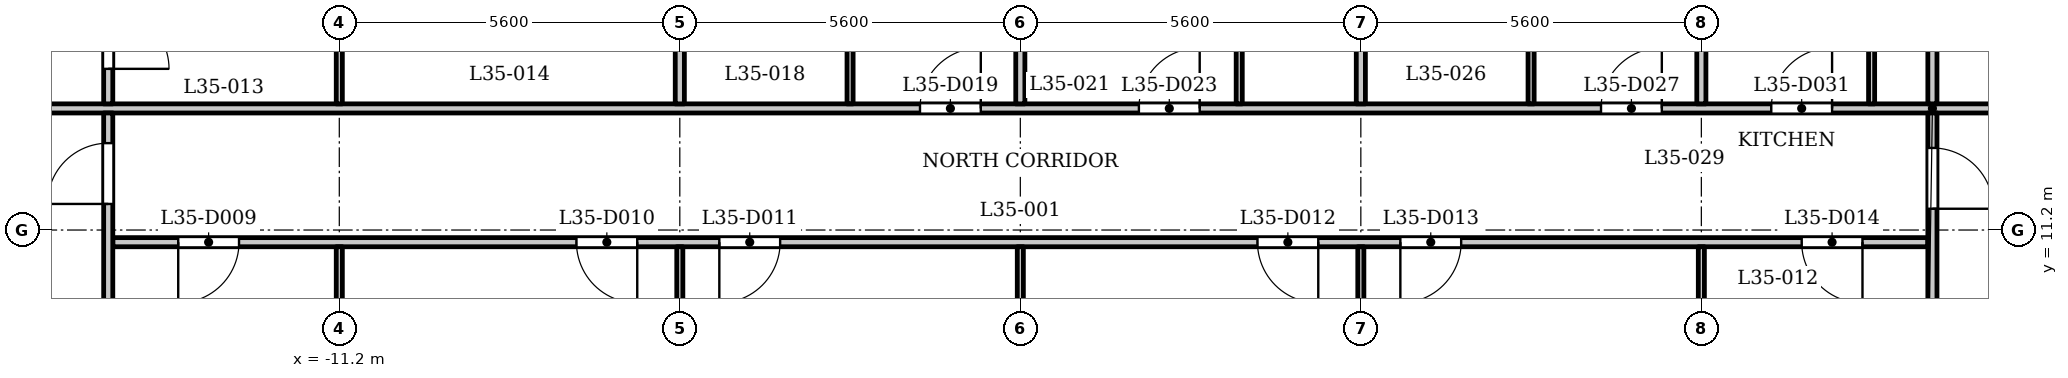
"""IFC4 building model, lengths in metres.
Left out: names, types, materials, properties, quantities, classifications, styles, units other than length and angle.
Written with IfcOpenShell. Run it as: python <this file> out.ifc"""

import sys

from ifc_helpers import new_model, si_unit, direction, frame, frame_2d, origin, place, context, subcontext, project, spatial, rectangle, extrude, element, fill, save


model = new_model("IFC4")
c1 = context("Model", 3, precision=1e-05, world=origin(), true_north=direction((0.0, 1.0)))
c2 = subcontext(c1, "Body", "Model", "MODEL_VIEW")
j1 = project(units=[si_unit("LENGTHUNIT", "METRE"), si_unit("PLANEANGLEUNIT", "RADIAN")], contexts=[c1])
p1 = place(None, origin())
s1 = spatial("IfcSite", under=j1, at=p1, CompositionType="ELEMENT")
p2 = place(p1, origin())
s2 = spatial("IfcBuilding", under=s1, at=p2, CompositionType="ELEMENT")
p3 = place(p2, frame((0.0, 0.0, 139.6)))
s3 = spatial("IfcBuildingStorey", under=s2, at=p3, CompositionType="ELEMENT", Elevation=139.6)
p4 = place(p3, frame((-14.925, 11.0, 0.0), z_axis=(0.0, 0.0, 1.0), x_axis=(1.0, 0.0, 0.0)))
e1 = element("IfcWall", 1, at=p4, inside=s3, PredefinedType="PARTITIONING", context=c2, shape_type="SweptSolid", body=[
    extrude(rectangle(XDim=29.85, YDim=0.15, at=frame_2d((14.925, 0.0))), origin(), (0.0, 0.0, 1.0), 3.2),
])
p5 = place(p4, frame((1.076, 0.0, 0.0)))
e2 = element("IfcOpeningElement", 2, at=p5, cuts=e1, PredefinedType="OPENING", context=c2, shape_type="SweptSolid", body=[
    extrude(rectangle(XDim=1.0, YDim=2.1, at=frame_2d((0.5, 1.05))), frame((0.0, 0.085, 0.0), z_axis=(0.0, -1.0, 0.0), x_axis=(1.0, 0.0, 0.0)), (0.0, 0.0, 1.0), 0.17),
])
p6 = place(p4, frame((7.625, 0.0, 0.0)))
e3 = element("IfcOpeningElement", 3, at=p6, cuts=e1, PredefinedType="OPENING", context=c2, shape_type="SweptSolid", body=[
    extrude(rectangle(XDim=1.0, YDim=2.1, at=frame_2d((0.5, 1.05))), frame((0.0, 0.085, 0.0), z_axis=(0.0, -1.0, 0.0), x_axis=(1.0, 0.0, 0.0)), (0.0, 0.0, 1.0), 0.17),
])
p7 = place(p4, frame((9.975, 0.0, 0.0)))
e4 = element("IfcOpeningElement", 4, at=p7, cuts=e1, PredefinedType="OPENING", context=c2, shape_type="SweptSolid", body=[
    extrude(rectangle(XDim=1.0, YDim=2.1, at=frame_2d((0.5, 1.05))), frame((0.0, 0.085, 0.0), z_axis=(0.0, -1.0, 0.0), x_axis=(1.0, 0.0, 0.0)), (0.0, 0.0, 1.0), 0.17),
])
p8 = place(p4, frame((18.825, 0.0, 0.0)))
e5 = element("IfcOpeningElement", 5, at=p8, cuts=e1, PredefinedType="OPENING", context=c2, shape_type="SweptSolid", body=[
    extrude(rectangle(XDim=1.0, YDim=2.1, at=frame_2d((0.5, 1.05))), frame((0.0, 0.085, 0.0), z_axis=(0.0, -1.0, 0.0), x_axis=(1.0, 0.0, 0.0)), (0.0, 0.0, 1.0), 0.17),
])
p9 = place(p4, frame((21.175, 0.0, 0.0)))
e6 = element("IfcOpeningElement", 6, at=p9, cuts=e1, PredefinedType="OPENING", context=c2, shape_type="SweptSolid", body=[
    extrude(rectangle(XDim=1.0, YDim=2.1, at=frame_2d((0.5, 1.05))), frame((0.0, 0.085, 0.0), z_axis=(0.0, -1.0, 0.0), x_axis=(1.0, 0.0, 0.0)), (0.0, 0.0, 1.0), 0.17),
])
p10 = place(p4, frame((27.775, 0.0, 0.0)))
e7 = element("IfcOpeningElement", 7, at=p10, cuts=e1, PredefinedType="OPENING", context=c2, shape_type="SweptSolid", body=[
    extrude(rectangle(XDim=1.0, YDim=2.1, at=frame_2d((0.5, 1.05))), frame((0.0, 0.085, 0.0), z_axis=(0.0, -1.0, 0.0), x_axis=(1.0, 0.0, 0.0)), (0.0, 0.0, 1.0), 0.17),
])
p11 = place(p3, frame((-17.4, 13.2, 0.0), z_axis=(0.0, 0.0, 1.0), x_axis=(1.0, 0.0, 0.0)))
e8 = element("IfcWall", 8, at=p11, inside=s3, PredefinedType="PARTITIONING", context=c2, shape_type="SweptSolid", body=[
    extrude(rectangle(XDim=34.8, YDim=0.15, at=frame_2d((17.4, 0.0))), origin(), (0.0, 0.0, 1.0), 3.2),
])
p12 = place(p11, frame((0.25, 0.0, 0.0)))
e9 = element("IfcOpeningElement", 9, at=p12, cuts=e8, PredefinedType="OPENING", context=c2, shape_type="SweptSolid", body=[
    extrude(rectangle(XDim=1.0, YDim=2.1, at=frame_2d((0.5, 1.05))), frame((0.0, 0.085, 0.0), z_axis=(0.0, -1.0, 0.0), x_axis=(1.0, 0.0, 0.0)), (0.0, 0.0, 1.0), 0.17),
])
p13 = place(p11, frame((33.65, 0.0, 0.0)))
e10 = element("IfcOpeningElement", 10, at=p13, cuts=e8, PredefinedType="OPENING", context=c2, shape_type="SweptSolid", body=[
    extrude(rectangle(XDim=1.0, YDim=2.1, at=frame_2d((0.5, 1.05))), frame((0.0, 0.085, 0.0), z_axis=(0.0, -1.0, 0.0), x_axis=(1.0, 0.0, 0.0)), (0.0, 0.0, 1.0), 0.17),
])
p14 = place(p11, frame((15.75, 0.0, 0.0)))
e11 = element("IfcOpeningElement", 11, at=p14, cuts=e8, PredefinedType="OPENING", context=c2, shape_type="SweptSolid", body=[
    extrude(rectangle(XDim=1.0, YDim=2.1, at=frame_2d((0.5, 1.05))), frame((0.0, 0.085, 0.0), z_axis=(0.0, -1.0, 0.0), x_axis=(1.0, 0.0, 0.0)), (0.0, 0.0, 1.0), 0.17),
])
p15 = place(p11, frame((19.35, 0.0, 0.0)))
e12 = element("IfcOpeningElement", 12, at=p15, cuts=e8, PredefinedType="OPENING", context=c2, shape_type="SweptSolid", body=[
    extrude(rectangle(XDim=1.0, YDim=2.1, at=frame_2d((0.5, 1.05))), frame((0.0, 0.085, 0.0), z_axis=(0.0, -1.0, 0.0), x_axis=(1.0, 0.0, 0.0)), (0.0, 0.0, 1.0), 0.17),
])
p16 = place(p11, frame((26.95, 0.0, 0.0)))
e13 = element("IfcOpeningElement", 13, at=p16, cuts=e8, PredefinedType="OPENING", context=c2, shape_type="SweptSolid", body=[
    extrude(rectangle(XDim=1.0, YDim=2.1, at=frame_2d((0.5, 1.05))), frame((0.0, 0.085, 0.0), z_axis=(0.0, -1.0, 0.0), x_axis=(1.0, 0.0, 0.0)), (0.0, 0.0, 1.0), 0.17),
])
p17 = place(p11, frame((29.75, 0.0, 0.0)))
e14 = element("IfcOpeningElement", 14, at=p17, cuts=e8, PredefinedType="OPENING", context=c2, shape_type="SweptSolid", body=[
    extrude(rectangle(XDim=1.0, YDim=2.1, at=frame_2d((0.5, 1.05))), frame((0.0, 0.085, 0.0), z_axis=(0.0, -1.0, 0.0), x_axis=(1.0, 0.0, 0.0)), (0.0, 0.0, 1.0), 0.17),
])
p18 = place(p3, frame((-15.0, 6.769, 0.0), z_axis=(0.0, 0.0, 1.0), x_axis=(0.0, 1.0, 0.0)))
e15 = element("IfcWall", 15, at=p18, inside=s3, PredefinedType="PARTITIONING", context=c2, shape_type="SweptSolid", body=[
    extrude(rectangle(XDim=6.356, YDim=0.15, at=frame_2d((3.178, 0.0))), origin(), (0.0, 0.0, 1.0), 3.2),
])
p19 = place(p18, frame((4.86, 0.0, 0.0)))
e16 = element("IfcOpeningElement", 16, at=p19, cuts=e15, PredefinedType="OPENING", context=c2, shape_type="SweptSolid", body=[
    extrude(rectangle(XDim=1.0, YDim=2.1, at=frame_2d((0.5, 1.05))), frame((0.0, 0.085, 0.0), z_axis=(0.0, -1.0, 0.0), x_axis=(1.0, 0.0, 0.0)), (0.0, 0.0, 1.0), 0.17),
])
p20 = place(p3, frame((-15.0, 13.275, 0.0), z_axis=(0.0, 0.0, 1.0), x_axis=(0.0, 1.0, 0.0)))
e17 = element("IfcWall", 17, at=p20, inside=s3, PredefinedType="PARTITIONING", context=c2, shape_type="SweptSolid", body=[
    extrude(rectangle(XDim=2.05, YDim=0.15, at=frame_2d((1.025, 0.0))), origin(), (0.0, 0.0, 1.0), 3.2),
])
p21 = place(p20, frame((0.576, 0.0, 0.0)))
e18 = element("IfcOpeningElement", 18, at=p21, cuts=e17, PredefinedType="OPENING", context=c2, shape_type="SweptSolid", body=[
    extrude(rectangle(XDim=1.0, YDim=2.1, at=frame_2d((0.5, 1.05))), frame((0.0, 0.085, 0.0), z_axis=(0.0, -1.0, 0.0), x_axis=(1.0, 0.0, 0.0)), (0.0, 0.0, 1.0), 0.17),
])
p22 = place(p3, frame((-11.2, 7.32, 0.0), z_axis=(0.0, 0.0, 1.0), x_axis=(0.0, 1.0, 0.0)))
e19 = element("IfcWall", 19, at=p22, inside=s3, PredefinedType="PARTITIONING", context=c2, shape_type="SweptSolid", body=[
    extrude(rectangle(XDim=3.605, YDim=0.1, at=frame_2d((1.802, 0.0))), origin(), (0.0, 0.0, 1.0), 3.2),
])
p23 = place(p3, frame((-11.2, 13.275, 0.0), z_axis=(0.0, 0.0, 1.0), x_axis=(0.0, 1.0, 0.0)))
e20 = element("IfcWall", 20, at=p23, inside=s3, PredefinedType="PARTITIONING", context=c2, shape_type="SweptSolid", body=[
    extrude(rectangle(XDim=3.175, YDim=0.1, at=frame_2d((1.587, 0.0))), origin(), (0.0, 0.0, 1.0), 3.2),
])
p24 = place(p3, frame((-5.6, 7.32, 0.0), z_axis=(0.0, 0.0, 1.0), x_axis=(0.0, 1.0, 0.0)))
e21 = element("IfcWall", 21, at=p24, inside=s3, PredefinedType="PARTITIONING", context=c2, shape_type="SweptSolid", body=[
    extrude(rectangle(XDim=3.605, YDim=0.1, at=frame_2d((1.802, 0.0))), origin(), (0.0, 0.0, 1.0), 3.2),
])
p25 = place(p3, frame((-5.6, 13.275, 0.0), z_axis=(0.0, 0.0, 1.0), x_axis=(0.0, 1.0, 0.0)))
e22 = element("IfcWall", 22, at=p25, inside=s3, PredefinedType="PARTITIONING", context=c2, shape_type="SweptSolid", body=[
    extrude(rectangle(XDim=3.175, YDim=0.15, at=frame_2d((1.587, 0.0))), origin(), (0.0, 0.0, 1.0), 3.2),
])
p26 = place(p3, frame((-2.8, 13.275, 0.0), z_axis=(0.0, 0.0, 1.0), x_axis=(0.0, 1.0, 0.0)))
e23 = element("IfcWall", 23, at=p26, inside=s3, PredefinedType="PARTITIONING", context=c2, shape_type="SweptSolid", body=[
    extrude(rectangle(XDim=3.175, YDim=0.1, at=frame_2d((1.587, 0.0))), origin(), (0.0, 0.0, 1.0), 3.2),
])
p27 = place(p3, frame((0.0, 7.32, 0.0), z_axis=(0.0, 0.0, 1.0), x_axis=(0.0, 1.0, 0.0)))
e24 = element("IfcWall", 24, at=p27, inside=s3, PredefinedType="PARTITIONING", context=c2, shape_type="SweptSolid", body=[
    extrude(rectangle(XDim=3.605, YDim=0.1, at=frame_2d((1.802, 0.0))), origin(), (0.0, 0.0, 1.0), 3.2),
])
p28 = place(p3, frame((0.0, 13.275, 0.0), z_axis=(0.0, 0.0, 1.0), x_axis=(0.0, 1.0, 0.0)))
e25 = element("IfcWall", 25, at=p28, inside=s3, PredefinedType="PARTITIONING", context=c2, shape_type="SweptSolid", body=[
    extrude(rectangle(XDim=3.175, YDim=0.15, at=frame_2d((1.587, 0.0))), origin(), (0.0, 0.0, 1.0), 3.2),
])
p29 = place(p3, frame((3.6, 13.275, 0.0), z_axis=(0.0, 0.0, 1.0), x_axis=(0.0, 1.0, 0.0)))
e26 = element("IfcWall", 26, at=p29, inside=s3, PredefinedType="PARTITIONING", context=c2, shape_type="SweptSolid", body=[
    extrude(rectangle(XDim=3.175, YDim=0.1, at=frame_2d((1.587, 0.0))), origin(), (0.0, 0.0, 1.0), 3.2),
])
p30 = place(p3, frame((5.6, 7.32, 0.0), z_axis=(0.0, 0.0, 1.0), x_axis=(0.0, 1.0, 0.0)))
e27 = element("IfcWall", 27, at=p30, inside=s3, PredefinedType="PARTITIONING", context=c2, shape_type="SweptSolid", body=[
    extrude(rectangle(XDim=3.605, YDim=0.1, at=frame_2d((1.802, 0.0))), origin(), (0.0, 0.0, 1.0), 3.2),
])
p31 = place(p3, frame((5.6, 13.275, 0.0), z_axis=(0.0, 0.0, 1.0), x_axis=(0.0, 1.0, 0.0)))
e28 = element("IfcWall", 28, at=p31, inside=s3, PredefinedType="PARTITIONING", context=c2, shape_type="SweptSolid", body=[
    extrude(rectangle(XDim=3.175, YDim=0.15, at=frame_2d((1.587, 0.0))), origin(), (0.0, 0.0, 1.0), 3.2),
])
p32 = place(p3, frame((8.4, 13.275, 0.0), z_axis=(0.0, 0.0, 1.0), x_axis=(0.0, 1.0, 0.0)))
e29 = element("IfcWall", 29, at=p32, inside=s3, PredefinedType="PARTITIONING", context=c2, shape_type="SweptSolid", body=[
    extrude(rectangle(XDim=3.175, YDim=0.1, at=frame_2d((1.587, 0.0))), origin(), (0.0, 0.0, 1.0), 3.2),
])
p33 = place(p3, frame((11.2, 7.32, 0.0), z_axis=(0.0, 0.0, 1.0), x_axis=(0.0, 1.0, 0.0)))
e30 = element("IfcWall", 30, at=p33, inside=s3, PredefinedType="PARTITIONING", context=c2, shape_type="SweptSolid", body=[
    extrude(rectangle(XDim=3.605, YDim=0.1, at=frame_2d((1.802, 0.0))), origin(), (0.0, 0.0, 1.0), 3.2),
])
p34 = place(p3, frame((11.2, 13.275, 0.0), z_axis=(0.0, 0.0, 1.0), x_axis=(0.0, 1.0, 0.0)))
e31 = element("IfcWall", 31, at=p34, inside=s3, PredefinedType="PARTITIONING", context=c2, shape_type="SweptSolid", body=[
    extrude(rectangle(XDim=3.175, YDim=0.15, at=frame_2d((1.587, 0.0))), origin(), (0.0, 0.0, 1.0), 3.2),
])
p35 = place(p3, frame((14.0, 13.275, 0.0), z_axis=(0.0, 0.0, 1.0), x_axis=(0.0, 1.0, 0.0)))
e32 = element("IfcWall", 32, at=p35, inside=s3, PredefinedType="PARTITIONING", context=c2, shape_type="SweptSolid", body=[
    extrude(rectangle(XDim=3.175, YDim=0.1, at=frame_2d((1.587, 0.0))), origin(), (0.0, 0.0, 1.0), 3.2),
])
p36 = place(p3, frame((15.0, 6.769, 0.0), z_axis=(0.0, 0.0, 1.0), x_axis=(0.0, 1.0, 0.0)))
e33 = element("IfcWall", 33, at=p36, inside=s3, PredefinedType="PARTITIONING", context=c2, shape_type="SweptSolid", body=[
    extrude(rectangle(XDim=6.356, YDim=0.15, at=frame_2d((3.178, 0.0))), origin(), (0.0, 0.0, 1.0), 3.2),
])
p37 = place(p36, frame((4.781, 0.0, 0.0)))
e34 = element("IfcOpeningElement", 34, at=p37, cuts=e33, PredefinedType="OPENING", context=c2, shape_type="SweptSolid", body=[
    extrude(rectangle(XDim=1.0, YDim=2.1, at=frame_2d((0.5, 1.05))), frame((0.0, 0.085, 0.0), z_axis=(0.0, -1.0, 0.0), x_axis=(1.0, 0.0, 0.0)), (0.0, 0.0, 1.0), 0.17),
])
p38 = place(p3, frame((15.0, 13.275, 0.0), z_axis=(0.0, 0.0, 1.0), x_axis=(0.0, 1.0, 0.0)))
e35 = element("IfcWall", 35, at=p38, inside=s3, PredefinedType="PARTITIONING", context=c2, shape_type="SweptSolid", body=[
    extrude(rectangle(XDim=2.05, YDim=0.15, at=frame_2d((1.025, 0.0))), origin(), (0.0, 0.0, 1.0), 3.2),
])
p39 = place(p19, origin())
e36 = element("IfcDoor", 36, at=p39, inside=s3, OperationType="SINGLE_SWING_RIGHT", PredefinedType="DOOR", context=c2, shape_type="SweptSolid", body=[
    extrude(rectangle(XDim=1.0, YDim=2.1, at=frame_2d((0.5, 1.05))), frame((0.0, 0.025, 0.0), z_axis=(0.0, -1.0, 0.0), x_axis=(1.0, 0.0, 0.0)), (0.0, 0.0, 1.0), 0.05),
])
fill(e16, e36)
p40 = place(p37, origin())
e37 = element("IfcDoor", 37, at=p40, inside=s3, OperationType="SINGLE_SWING_LEFT", PredefinedType="DOOR", context=c2, shape_type="SweptSolid", body=[
    extrude(rectangle(XDim=1.0, YDim=2.1, at=frame_2d((0.5, 1.05))), frame((0.0, 0.025, 0.0), z_axis=(0.0, -1.0, 0.0), x_axis=(1.0, 0.0, 0.0)), (0.0, 0.0, 1.0), 0.05),
])
fill(e34, e37)
p41 = place(p5, origin())
e38 = element("IfcDoor", 38, at=p41, inside=s3, OperationType="SINGLE_SWING_LEFT", PredefinedType="DOOR", context=c2, shape_type="SweptSolid", body=[
    extrude(rectangle(XDim=1.0, YDim=2.1, at=frame_2d((0.5, 1.05))), frame((0.0, 0.025, 0.0), z_axis=(0.0, -1.0, 0.0), x_axis=(1.0, 0.0, 0.0)), (0.0, 0.0, 1.0), 0.05),
])
fill(e2, e38)
p42 = place(p6, origin())
e39 = element("IfcDoor", 39, at=p42, inside=s3, OperationType="SINGLE_SWING_RIGHT", PredefinedType="DOOR", context=c2, shape_type="SweptSolid", body=[
    extrude(rectangle(XDim=1.0, YDim=2.1, at=frame_2d((0.5, 1.05))), frame((0.0, 0.025, 0.0), z_axis=(0.0, -1.0, 0.0), x_axis=(1.0, 0.0, 0.0)), (0.0, 0.0, 1.0), 0.05),
])
fill(e3, e39)
p43 = place(p7, origin())
e40 = element("IfcDoor", 40, at=p43, inside=s3, OperationType="SINGLE_SWING_LEFT", PredefinedType="DOOR", context=c2, shape_type="SweptSolid", body=[
    extrude(rectangle(XDim=1.0, YDim=2.1, at=frame_2d((0.5, 1.05))), frame((0.0, 0.025, 0.0), z_axis=(0.0, -1.0, 0.0), x_axis=(1.0, 0.0, 0.0)), (0.0, 0.0, 1.0), 0.05),
])
fill(e4, e40)
p44 = place(p8, origin())
e41 = element("IfcDoor", 41, at=p44, inside=s3, OperationType="SINGLE_SWING_RIGHT", PredefinedType="DOOR", context=c2, shape_type="SweptSolid", body=[
    extrude(rectangle(XDim=1.0, YDim=2.1, at=frame_2d((0.5, 1.05))), frame((0.0, 0.025, 0.0), z_axis=(0.0, -1.0, 0.0), x_axis=(1.0, 0.0, 0.0)), (0.0, 0.0, 1.0), 0.05),
])
fill(e5, e41)
p45 = place(p9, origin())
e42 = element("IfcDoor", 42, at=p45, inside=s3, OperationType="SINGLE_SWING_LEFT", PredefinedType="DOOR", context=c2, shape_type="SweptSolid", body=[
    extrude(rectangle(XDim=1.0, YDim=2.1, at=frame_2d((0.5, 1.05))), frame((0.0, 0.025, 0.0), z_axis=(0.0, -1.0, 0.0), x_axis=(1.0, 0.0, 0.0)), (0.0, 0.0, 1.0), 0.05),
])
fill(e6, e42)
p46 = place(p10, origin())
e43 = element("IfcDoor", 43, at=p46, inside=s3, OperationType="SINGLE_SWING_RIGHT", PredefinedType="DOOR", context=c2, shape_type="SweptSolid", body=[
    extrude(rectangle(XDim=1.0, YDim=2.1, at=frame_2d((0.5, 1.05))), frame((0.0, 0.025, 0.0), z_axis=(0.0, -1.0, 0.0), x_axis=(1.0, 0.0, 0.0)), (0.0, 0.0, 1.0), 0.05),
])
fill(e7, e43)
p47 = place(p21, origin())
e44 = element("IfcDoor", 44, at=p47, inside=s3, OperationType="SINGLE_SWING_LEFT", PredefinedType="DOOR", context=c2, shape_type="SweptSolid", body=[
    extrude(rectangle(XDim=1.0, YDim=2.1, at=frame_2d((0.5, 1.05))), frame((0.0, 0.025, 0.0), z_axis=(0.0, -1.0, 0.0), x_axis=(1.0, 0.0, 0.0)), (0.0, 0.0, 1.0), 0.05),
])
fill(e18, e44)
p48 = place(p14, origin())
e45 = element("IfcDoor", 45, at=p48, inside=s3, OperationType="SINGLE_SWING_LEFT", PredefinedType="DOOR", context=c2, shape_type="SweptSolid", body=[
    extrude(rectangle(XDim=1.0, YDim=2.1, at=frame_2d((0.5, 1.05))), frame((0.0, 0.025, 0.0), z_axis=(0.0, -1.0, 0.0), x_axis=(1.0, 0.0, 0.0)), (0.0, 0.0, 1.0), 0.05),
])
fill(e11, e45)
p49 = place(p15, origin())
e46 = element("IfcDoor", 46, at=p49, inside=s3, OperationType="SINGLE_SWING_LEFT", PredefinedType="DOOR", context=c2, shape_type="SweptSolid", body=[
    extrude(rectangle(XDim=1.0, YDim=2.1, at=frame_2d((0.5, 1.05))), frame((0.0, 0.025, 0.0), z_axis=(0.0, -1.0, 0.0), x_axis=(1.0, 0.0, 0.0)), (0.0, 0.0, 1.0), 0.05),
])
fill(e12, e46)
p50 = place(p16, origin())
e47 = element("IfcDoor", 47, at=p50, inside=s3, OperationType="SINGLE_SWING_LEFT", PredefinedType="DOOR", context=c2, shape_type="SweptSolid", body=[
    extrude(rectangle(XDim=1.0, YDim=2.1, at=frame_2d((0.5, 1.05))), frame((0.0, 0.025, 0.0), z_axis=(0.0, -1.0, 0.0), x_axis=(1.0, 0.0, 0.0)), (0.0, 0.0, 1.0), 0.05),
])
fill(e13, e47)
p51 = place(p17, origin())
e48 = element("IfcDoor", 48, at=p51, inside=s3, OperationType="SINGLE_SWING_LEFT", PredefinedType="DOOR", context=c2, shape_type="SweptSolid", body=[
    extrude(rectangle(XDim=1.0, YDim=2.1, at=frame_2d((0.5, 1.05))), frame((0.0, 0.025, 0.0), z_axis=(0.0, -1.0, 0.0), x_axis=(1.0, 0.0, 0.0)), (0.0, 0.0, 1.0), 0.05),
])
fill(e14, e48)
save(model, sys.argv[1])
